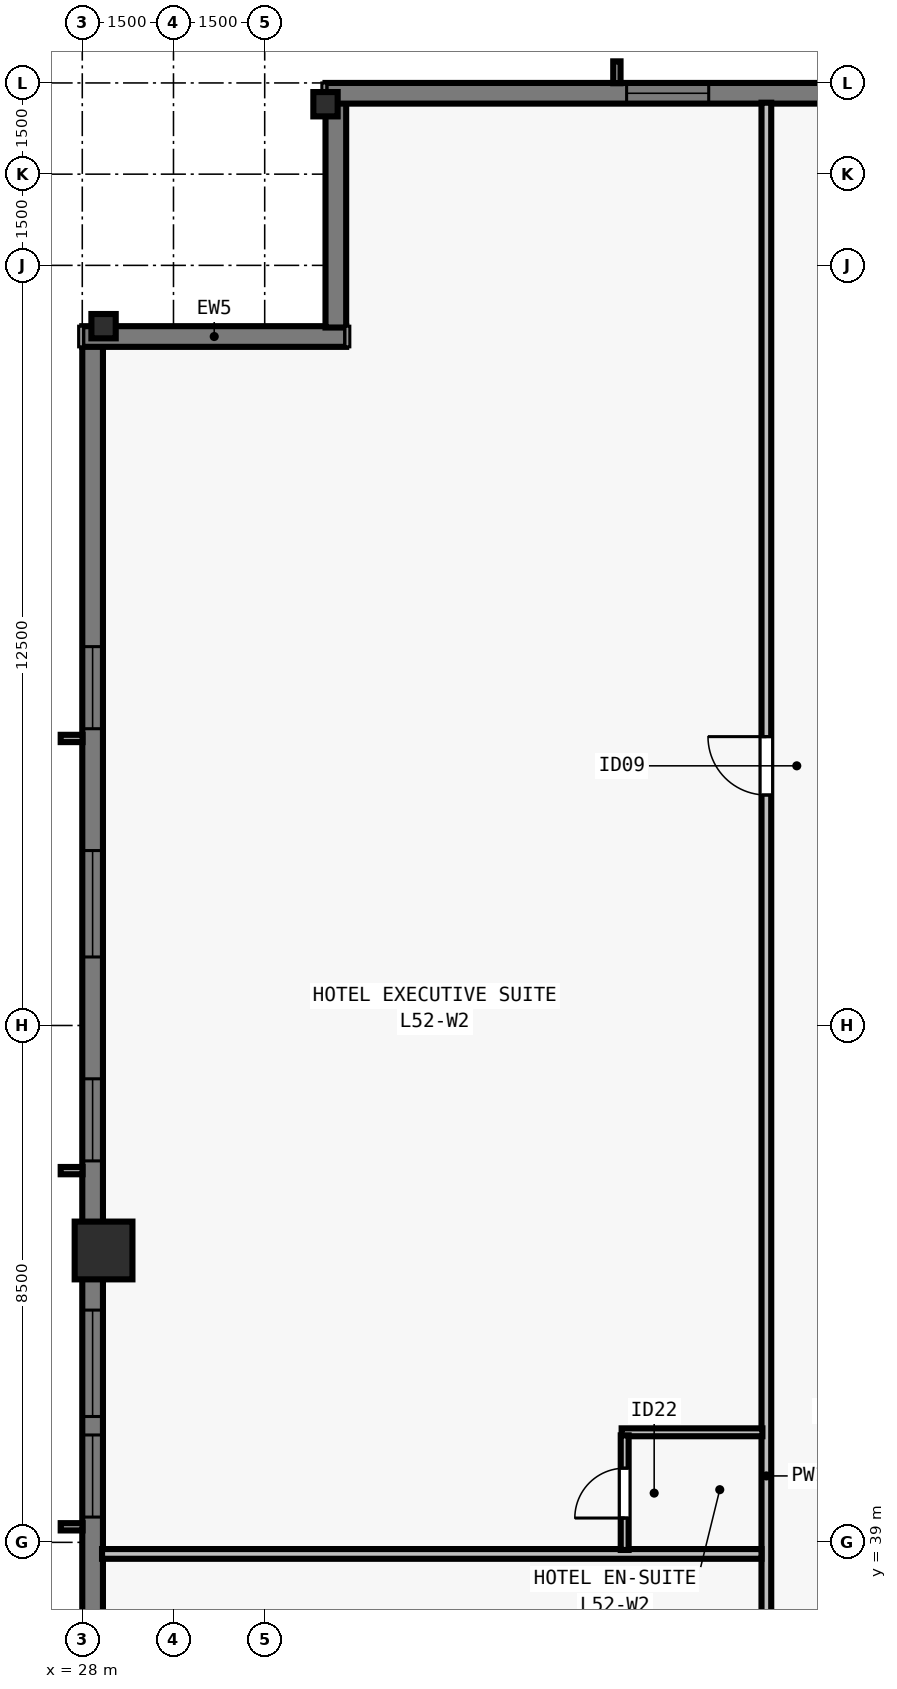
"""IFC4 building model, lengths in metres.
Left out: names, types, materials, properties, quantities, classifications, styles, units other than length and angle.
Written with IfcOpenShell. Run it as: python <this file> out.ifc"""

import sys

from ifc_helpers import new_model, si_unit, direction, frame, frame_2d, origin, origin_2d, place, context, subcontext, project, spatial, rectangle, i_section, extrude, element, fill, save


model = new_model("IFC4")
c1 = context("Model", 3, precision=1e-05, world=origin(), true_north=direction((0.0, 1.0)))
c2 = subcontext(c1, "Body", "Model", "MODEL_VIEW")
j1 = project(units=[si_unit("LENGTHUNIT", "METRE"), si_unit("PLANEANGLEUNIT", "RADIAN")], contexts=[c1])
p1 = place(None, origin())
s1 = spatial("IfcSite", under=j1, at=p1, CompositionType="ELEMENT")
p2 = place(p1, origin())
s2 = spatial("IfcBuilding", under=s1, at=p2, CompositionType="ELEMENT")
p3 = place(p2, frame((0.0, 0.0, 190.0)))
s3 = spatial("IfcBuildingStorey", under=s2, at=p3, CompositionType="ELEMENT", Elevation=190.0)
for number, where, z_axis, x_axis in (
    (1, (32.0, 62.65, 0.0), (0.0, 0.0, 1.0), (1.0, 0.0, 0.0)),
    (2, (28.35, 59.0, 0.0), (0.0, 0.0, 1.0), (0.0, 1.0, 0.0)),
):
    element("IfcColumn", number, at=place(p3, frame(where, z_axis=z_axis, x_axis=x_axis)), inside=s3, PredefinedType="COLUMN", context=c2, shape_type="SweptSolid", body=[
        extrude(i_section(OverallWidth=0.4, OverallDepth=0.4, WebThickness=0.022, FlangeThickness=0.036, at=origin_2d()), origin(), (0.0, 0.0, 1.0), 3.5),
    ])
p4 = place(p3, frame((28.35, 43.8, 0.0), z_axis=(0.0, 0.0, 1.0), x_axis=(0.0, 1.0, 0.0)))
e3 = element("IfcColumn", 3, at=p4, inside=s3, PredefinedType="COLUMN", context=c2, shape_type="SweptSolid", body=[
    extrude(rectangle(XDim=0.95, YDim=0.95, at=origin_2d()), origin(), (0.0, 0.0, 1.0), 3.5),
])
p5 = place(p3, frame((28.17, 19.0, 0.0), z_axis=(0.0, 0.0, 1.0), x_axis=(0.0, 1.0, 0.0)))
e4 = element("IfcWall", 4, at=p5, inside=s3, PredefinedType="SOLIDWALL", context=c2, shape_type="SweptSolid", body=[
    extrude(rectangle(XDim=39.682, YDim=0.34, at=frame_2d((19.841, 0.0))), origin(), (0.0, 0.0, 1.0), 3.24),
])
p6 = place(p5, frame((4.952, 0.0, 0.8)))
e5 = element("IfcOpeningElement", 5, at=p6, cuts=e4, PredefinedType="OPENING", context=c2, shape_type="SweptSolid", body=[
    extrude(rectangle(XDim=1.35, YDim=1.62, at=frame_2d((0.675, 0.81))), frame((0.0, 0.18, 0.0), z_axis=(0.0, -1.0, 0.0), x_axis=(1.0, 0.0, 0.0)), (0.0, 0.0, 1.0), 0.36),
])
p7 = place(p5, frame((8.305, 0.0, 0.8)))
e6 = element("IfcOpeningElement", 6, at=p7, cuts=e4, PredefinedType="OPENING", context=c2, shape_type="SweptSolid", body=[
    extrude(rectangle(XDim=1.75, YDim=1.62, at=frame_2d((0.875, 0.81))), frame((0.0, 0.18, 0.0), z_axis=(0.0, -1.0, 0.0), x_axis=(1.0, 0.0, 0.0)), (0.0, 0.0, 1.0), 0.36),
])
p8 = place(p5, frame((12.059, 0.0, 0.8)))
e7 = element("IfcOpeningElement", 7, at=p8, cuts=e4, PredefinedType="OPENING", context=c2, shape_type="SweptSolid", body=[
    extrude(rectangle(XDim=1.35, YDim=1.62, at=frame_2d((0.675, 0.81))), frame((0.0, 0.18, 0.0), z_axis=(0.0, -1.0, 0.0), x_axis=(1.0, 0.0, 0.0)), (0.0, 0.0, 1.0), 0.36),
])
p9 = place(p5, frame((16.262, 0.0, 0.8)))
e8 = element("IfcOpeningElement", 8, at=p9, cuts=e4, PredefinedType="OPENING", context=c2, shape_type="SweptSolid", body=[
    extrude(rectangle(XDim=1.75, YDim=1.62, at=frame_2d((0.875, 0.81))), frame((0.0, 0.18, 0.0), z_axis=(0.0, -1.0, 0.0), x_axis=(1.0, 0.0, 0.0)), (0.0, 0.0, 1.0), 0.36),
])
p10 = place(p5, frame((20.416, 0.0, 0.8)))
e9 = element("IfcOpeningElement", 9, at=p10, cuts=e4, PredefinedType="OPENING", context=c2, shape_type="SweptSolid", body=[
    extrude(rectangle(XDim=1.35, YDim=1.62, at=frame_2d((0.675, 0.81))), frame((0.0, 0.18, 0.0), z_axis=(0.0, -1.0, 0.0), x_axis=(1.0, 0.0, 0.0)), (0.0, 0.0, 1.0), 0.36),
])
p11 = place(p5, frame((22.07, 0.0, 0.8)))
e10 = element("IfcOpeningElement", 10, at=p11, cuts=e4, PredefinedType="OPENING", context=c2, shape_type="SweptSolid", body=[
    extrude(rectangle(XDim=1.75, YDim=1.62, at=frame_2d((0.875, 0.81))), frame((0.0, 0.18, 0.0), z_axis=(0.0, -1.0, 0.0), x_axis=(1.0, 0.0, 0.0)), (0.0, 0.0, 1.0), 0.36),
])
p12 = place(p5, frame((26.273, 0.0, 0.8)))
e11 = element("IfcOpeningElement", 11, at=p12, cuts=e4, PredefinedType="OPENING", context=c2, shape_type="SweptSolid", body=[
    extrude(rectangle(XDim=1.35, YDim=1.62, at=frame_2d((0.675, 0.81))), frame((0.0, 0.18, 0.0), z_axis=(0.0, -1.0, 0.0), x_axis=(1.0, 0.0, 0.0)), (0.0, 0.0, 1.0), 0.36),
])
p13 = place(p5, frame((29.627, 0.0, 0.8)))
e12 = element("IfcOpeningElement", 12, at=p13, cuts=e4, PredefinedType="OPENING", context=c2, shape_type="SweptSolid", body=[
    extrude(rectangle(XDim=1.75, YDim=1.62, at=frame_2d((0.875, 0.81))), frame((0.0, 0.18, 0.0), z_axis=(0.0, -1.0, 0.0), x_axis=(1.0, 0.0, 0.0)), (0.0, 0.0, 1.0), 0.36),
])
p14 = place(p5, frame((33.38, 0.0, 0.8)))
e13 = element("IfcOpeningElement", 13, at=p14, cuts=e4, PredefinedType="OPENING", context=c2, shape_type="SweptSolid", body=[
    extrude(rectangle(XDim=1.35, YDim=1.62, at=frame_2d((0.675, 0.81))), frame((0.0, 0.18, 0.0), z_axis=(0.0, -1.0, 0.0), x_axis=(1.0, 0.0, 0.0)), (0.0, 0.0, 1.0), 0.36),
])
p15 = place(p3, frame((28.0, 58.83, 0.0), z_axis=(0.0, 0.0, 1.0), x_axis=(1.0, 0.0, 0.0)))
e14 = element("IfcWall", 14, at=p15, inside=s3, PredefinedType="SOLIDWALL", context=c2, shape_type="SweptSolid", body=[
    extrude(rectangle(XDim=4.34, YDim=0.34, at=frame_2d((2.17, 0.0))), origin(), (0.0, 0.0, 1.0), 3.24),
])
p16 = place(p3, frame((32.17, 58.978, 0.0), z_axis=(0.0, 0.0, 1.0), x_axis=(0.0, 1.0, 0.0)))
e15 = element("IfcWall", 15, at=p16, inside=s3, PredefinedType="SOLIDWALL", context=c2, shape_type="SweptSolid", body=[
    extrude(rectangle(XDim=3.704, YDim=0.34, at=frame_2d((1.852, 0.0))), origin(), (0.0, 0.0, 1.0), 3.24),
])
p17 = place(p3, frame((32.0, 62.83, 0.0), z_axis=(0.0, 0.0, 1.0), x_axis=(1.0, 0.0, 0.0)))
e16 = element("IfcWall", 16, at=p17, inside=s3, PredefinedType="SOLIDWALL", context=c2, shape_type="SweptSolid", body=[
    extrude(rectangle(XDim=39.682, YDim=0.34, at=frame_2d((19.841, 0.0))), origin(), (0.0, 0.0, 1.0), 3.24),
])
p18 = place(p17, frame((4.952, 0.0, 0.8)))
e17 = element("IfcOpeningElement", 17, at=p18, cuts=e16, PredefinedType="OPENING", context=c2, shape_type="SweptSolid", body=[
    extrude(rectangle(XDim=1.35, YDim=1.62, at=frame_2d((0.675, 0.81))), frame((0.0, 0.18, 0.0), z_axis=(0.0, -1.0, 0.0), x_axis=(1.0, 0.0, 0.0)), (0.0, 0.0, 1.0), 0.36),
])
p19 = place(p17, frame((12.059, 0.0, 0.8)))
e18 = element("IfcOpeningElement", 18, at=p19, cuts=e16, PredefinedType="OPENING", context=c2, shape_type="SweptSolid", body=[
    extrude(rectangle(XDim=1.35, YDim=1.62, at=frame_2d((0.675, 0.81))), frame((0.0, 0.18, 0.0), z_axis=(0.0, -1.0, 0.0), x_axis=(1.0, 0.0, 0.0)), (0.0, 0.0, 1.0), 0.36),
])
p20 = place(p17, frame((16.262, 0.0, 0.8)))
e19 = element("IfcOpeningElement", 19, at=p20, cuts=e16, PredefinedType="OPENING", context=c2, shape_type="SweptSolid", body=[
    extrude(rectangle(XDim=1.75, YDim=1.62, at=frame_2d((0.875, 0.81))), frame((0.0, 0.18, 0.0), z_axis=(0.0, -1.0, 0.0), x_axis=(1.0, 0.0, 0.0)), (0.0, 0.0, 1.0), 0.36),
])
p21 = place(p17, frame((19.166, 0.0, 0.8)))
e20 = element("IfcOpeningElement", 20, at=p21, cuts=e16, PredefinedType="OPENING", context=c2, shape_type="SweptSolid", body=[
    extrude(rectangle(XDim=1.35, YDim=1.62, at=frame_2d((0.675, 0.81))), frame((0.0, 0.18, 0.0), z_axis=(0.0, -1.0, 0.0), x_axis=(1.0, 0.0, 0.0)), (0.0, 0.0, 1.0), 0.36),
])
p22 = place(p17, frame((22.07, 0.0, 0.8)))
e21 = element("IfcOpeningElement", 21, at=p22, cuts=e16, PredefinedType="OPENING", context=c2, shape_type="SweptSolid", body=[
    extrude(rectangle(XDim=1.75, YDim=1.62, at=frame_2d((0.875, 0.81))), frame((0.0, 0.18, 0.0), z_axis=(0.0, -1.0, 0.0), x_axis=(1.0, 0.0, 0.0)), (0.0, 0.0, 1.0), 0.36),
])
p23 = place(p17, frame((26.273, 0.0, 0.8)))
e22 = element("IfcOpeningElement", 22, at=p23, cuts=e16, PredefinedType="OPENING", context=c2, shape_type="SweptSolid", body=[
    extrude(rectangle(XDim=1.35, YDim=1.62, at=frame_2d((0.675, 0.81))), frame((0.0, 0.18, 0.0), z_axis=(0.0, -1.0, 0.0), x_axis=(1.0, 0.0, 0.0)), (0.0, 0.0, 1.0), 0.36),
])
p24 = place(p17, frame((29.177, 0.0, 0.8)))
e23 = element("IfcOpeningElement", 23, at=p24, cuts=e16, PredefinedType="OPENING", context=c2, shape_type="SweptSolid", body=[
    extrude(rectangle(XDim=1.75, YDim=1.62, at=frame_2d((0.875, 0.81))), frame((0.0, 0.18, 0.0), z_axis=(0.0, -1.0, 0.0), x_axis=(1.0, 0.0, 0.0)), (0.0, 0.0, 1.0), 0.36),
])
p25 = place(p17, frame((34.23, 0.0, 0.8)))
e24 = element("IfcOpeningElement", 24, at=p25, cuts=e16, PredefinedType="OPENING", context=c2, shape_type="SweptSolid", body=[
    extrude(rectangle(XDim=1.35, YDim=1.62, at=frame_2d((0.675, 0.81))), frame((0.0, 0.18, 0.0), z_axis=(0.0, -1.0, 0.0), x_axis=(1.0, 0.0, 0.0)), (0.0, 0.0, 1.0), 0.36),
])
p26 = place(p3, frame((39.25, 15.325, 0.0), z_axis=(0.0, 0.0, 1.0), x_axis=(0.0, 1.0, 0.0)))
e25 = element("IfcWall", 25, at=p26, inside=s3, PredefinedType="PARTITIONING", context=c2, shape_type="SweptSolid", body=[
    extrude(rectangle(XDim=47.35, YDim=0.16, at=frame_2d((23.675, 0.0))), origin(), (0.0, 0.0, 1.0), 2.515),
])
p27 = place(p26, frame((12.61, 0.0, 0.0)))
e26 = element("IfcOpeningElement", 26, at=p27, cuts=e25, PredefinedType="OPENING", context=c2, shape_type="SweptSolid", body=[
    extrude(rectangle(XDim=0.96, YDim=2.15, at=frame_2d((0.48, 1.075))), frame((0.0, 0.09, 0.0), z_axis=(0.0, -1.0, 0.0), x_axis=(1.0, 0.0, 0.0)), (0.0, 0.0, 1.0), 0.18),
])
p28 = place(p26, frame((35.965, 0.0, 0.0)))
e27 = element("IfcOpeningElement", 27, at=p28, cuts=e25, PredefinedType="OPENING", context=c2, shape_type="SweptSolid", body=[
    extrude(rectangle(XDim=0.96, YDim=2.15, at=frame_2d((0.48, 1.075))), frame((0.0, 0.09, 0.0), z_axis=(0.0, -1.0, 0.0), x_axis=(1.0, 0.0, 0.0)), (0.0, 0.0, 1.0), 0.18),
])
p29 = place(p3, frame((28.325, 38.81, 0.0), z_axis=(0.0, 0.0, 1.0), x_axis=(1.0, 0.0, 0.0)))
e28 = element("IfcWall", 28, at=p29, inside=s3, PredefinedType="PARTITIONING", context=c2, shape_type="SweptSolid", body=[
    extrude(rectangle(XDim=10.845, YDim=0.16, at=frame_2d((5.422, 0.0))), origin(), (0.0, 0.0, 1.0), 2.856),
])
p30 = place(p3, frame((36.87, 40.81, 0.0), z_axis=(0.0, 0.0, 1.0), x_axis=(1.0, 0.0, 0.0)))
e29 = element("IfcWall", 29, at=p30, inside=s3, PredefinedType="PLUMBINGWALL", context=c2, shape_type="SweptSolid", body=[
    extrude(rectangle(XDim=2.315, YDim=0.13, at=frame_2d((1.157, 0.0))), origin(), (0.0, 0.0, 1.0), 3.24),
])
p31 = place(p3, frame((36.92, 38.875, 0.0), z_axis=(0.0, 0.0, 1.0), x_axis=(0.0, 1.0, 0.0)))
e30 = element("IfcWall", 30, at=p31, inside=s3, PredefinedType="PLUMBINGWALL", context=c2, shape_type="SweptSolid", body=[
    extrude(rectangle(XDim=1.885, YDim=0.13, at=frame_2d((0.942, 0.0))), origin(), (0.0, 0.0, 1.0), 3.24),
])
p32 = place(p31, frame((0.525, 0.0, 0.0)))
e31 = element("IfcOpeningElement", 31, at=p32, cuts=e30, PredefinedType="OPENING", context=c2, shape_type="SweptSolid", body=[
    extrude(rectangle(XDim=0.82, YDim=2.1, at=frame_2d((0.41, 1.05))), frame((0.0, 0.075, 0.0), z_axis=(0.0, -1.0, 0.0), x_axis=(1.0, 0.0, 0.0)), (0.0, 0.0, 1.0), 0.15),
])
p33 = place(p10, origin())
e32 = element("IfcWindow", 32, at=p33, inside=s3, PartitioningType="SINGLE_PANEL", PredefinedType="WINDOW", context=c2, shape_type="SweptSolid", body=[
    extrude(rectangle(XDim=1.35, YDim=1.62, at=frame_2d((0.675, 0.81))), frame((0.0, -0.05, 0.0), z_axis=(0.0, -1.0, 0.0), x_axis=(1.0, 0.0, 0.0)), (0.0, 0.0, 1.0), 0.06),
])
fill(e9, e32)
p34 = place(p11, origin())
e33 = element("IfcWindow", 33, at=p34, inside=s3, PartitioningType="SINGLE_PANEL", PredefinedType="WINDOW", context=c2, shape_type="SweptSolid", body=[
    extrude(rectangle(XDim=1.75, YDim=1.62, at=frame_2d((0.875, 0.81))), frame((0.0, -0.05, 0.0), z_axis=(0.0, -1.0, 0.0), x_axis=(1.0, 0.0, 0.0)), (0.0, 0.0, 1.0), 0.06),
])
fill(e10, e33)
p35 = place(p12, origin())
e34 = element("IfcWindow", 34, at=p35, inside=s3, PartitioningType="SINGLE_PANEL", PredefinedType="WINDOW", context=c2, shape_type="SweptSolid", body=[
    extrude(rectangle(XDim=1.35, YDim=1.62, at=frame_2d((0.675, 0.81))), frame((0.0, -0.05, 0.0), z_axis=(0.0, -1.0, 0.0), x_axis=(1.0, 0.0, 0.0)), (0.0, 0.0, 1.0), 0.06),
])
fill(e11, e34)
p36 = place(p13, origin())
e35 = element("IfcWindow", 35, at=p36, inside=s3, PartitioningType="SINGLE_PANEL", PredefinedType="WINDOW", context=c2, shape_type="SweptSolid", body=[
    extrude(rectangle(XDim=1.75, YDim=1.62, at=frame_2d((0.875, 0.81))), frame((0.0, -0.05, 0.0), z_axis=(0.0, -1.0, 0.0), x_axis=(1.0, 0.0, 0.0)), (0.0, 0.0, 1.0), 0.06),
])
fill(e12, e35)
p37 = place(p14, origin())
e36 = element("IfcWindow", 36, at=p37, inside=s3, PartitioningType="SINGLE_PANEL", PredefinedType="WINDOW", context=c2, shape_type="SweptSolid", body=[
    extrude(rectangle(XDim=1.35, YDim=1.62, at=frame_2d((0.675, 0.81))), frame((0.0, -0.05, 0.0), z_axis=(0.0, -1.0, 0.0), x_axis=(1.0, 0.0, 0.0)), (0.0, 0.0, 1.0), 0.06),
])
fill(e13, e36)
p38 = place(p18, origin())
e37 = element("IfcWindow", 37, at=p38, inside=s3, PartitioningType="SINGLE_PANEL", PredefinedType="WINDOW", context=c2, shape_type="SweptSolid", body=[
    extrude(rectangle(XDim=1.35, YDim=1.62, at=frame_2d((0.675, 0.81))), frame((0.0, -0.05, 0.0), z_axis=(0.0, -1.0, 0.0), x_axis=(1.0, 0.0, 0.0)), (0.0, 0.0, 1.0), 0.06),
])
fill(e17, e37)
p39 = place(p32, origin())
e38 = element("IfcDoor", 38, at=p39, inside=s3, OperationType="SINGLE_SWING_LEFT", PredefinedType="DOOR", context=c2, shape_type="SweptSolid", body=[
    extrude(rectangle(XDim=0.82, YDim=2.1, at=frame_2d((0.41, 1.05))), frame((0.0, 0.025, 0.0), z_axis=(0.0, -1.0, 0.0), x_axis=(1.0, 0.0, 0.0)), (0.0, 0.0, 1.0), 0.05),
])
fill(e31, e38)
p40 = place(p28, origin())
e39 = element("IfcDoor", 39, at=p40, inside=s3, OperationType="SINGLE_SWING_RIGHT", PredefinedType="DOOR", context=c2, shape_type="SweptSolid", body=[
    extrude(rectangle(XDim=0.96, YDim=2.15, at=frame_2d((0.48, 1.075))), frame((0.0, 0.025, 0.0), z_axis=(0.0, -1.0, 0.0), x_axis=(1.0, 0.0, 0.0)), (0.0, 0.0, 1.0), 0.05),
])
fill(e27, e39)
save(model, sys.argv[1])
